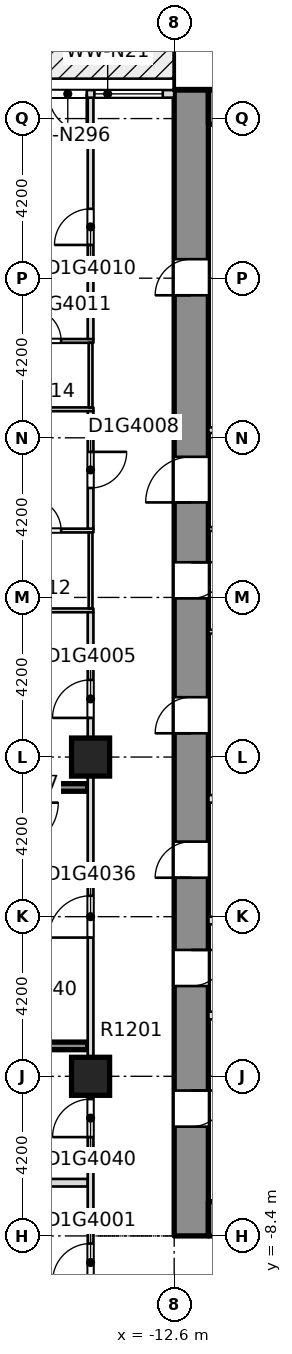
"""IFC4 building model, lengths in metres.
Left out: names, types, materials, properties, quantities, classifications, styles, units other than length and angle.
Written with IfcOpenShell. Run it as: python <this file> out.ifc"""

import sys

from ifc_helpers import new_model, si_unit, direction, frame, frame_2d, origin, origin_2d, place, context, subcontext, project, spatial, rectangle, extrude, element, fill, save


model = new_model("IFC4")
c1 = context("Model", 3, precision=1e-05, world=origin(), true_north=direction((0.0, 1.0)))
c2 = subcontext(c1, "Body", "Model", "MODEL_VIEW")
j1 = project(units=[si_unit("LENGTHUNIT", "METRE"), si_unit("PLANEANGLEUNIT", "RADIAN")], contexts=[c1])
p1 = place(None, origin())
s1 = spatial("IfcSite", under=j1, at=p1, CompositionType="ELEMENT")
p2 = place(p1, origin())
s2 = spatial("IfcBuilding", under=s1, at=p2, CompositionType="ELEMENT")
p3 = place(p2, frame((0.0, 0.0, 55.2)))
s3 = spatial("IfcBuildingStorey", under=s2, at=p3, CompositionType="ELEMENT", Elevation=55.2)
p4 = place(p3, frame((-12.15, -8.4, -0.32), z_axis=(0.0, 0.0, 1.0), x_axis=(0.0, 1.0, 0.0)))
e1 = element("IfcWall", 1, at=p4, inside=s3, PredefinedType="SHEAR", context=c2, shape_type="SweptSolid", body=[
    extrude(rectangle(XDim=30.15, YDim=0.9, at=frame_2d((15.075, 0.0))), origin(), (0.0, 0.0, 1.0), 3.45),
])
p5 = place(p4, frame((2.875, 0.0, 0.32)))
e2 = element("IfcOpeningElement", 2, at=p5, cuts=e1, PredefinedType="OPENING", context=c2, shape_type="SweptSolid", body=[
    extrude(rectangle(XDim=0.95, YDim=2.1, at=frame_2d((0.475, 1.05))), frame((0.0, 0.46, 0.0), z_axis=(0.0, -1.0, 0.0), x_axis=(1.0, 0.0, 0.0)), (0.0, 0.0, 1.0), 0.92),
])
p6 = place(p4, frame((6.575, 0.0, 0.32)))
e3 = element("IfcOpeningElement", 3, at=p6, cuts=e1, PredefinedType="OPENING", context=c2, shape_type="SweptSolid", body=[
    extrude(rectangle(XDim=0.95, YDim=2.1, at=frame_2d((0.475, 1.05))), frame((0.0, 0.46, 0.0), z_axis=(0.0, -1.0, 0.0), x_axis=(1.0, 0.0, 0.0)), (0.0, 0.0, 1.0), 0.92),
])
p7 = place(p4, frame((9.425, 0.0, 0.32)))
e4 = element("IfcOpeningElement", 4, at=p7, cuts=e1, PredefinedType="OPENING", context=c2, shape_type="SweptSolid", body=[
    extrude(rectangle(XDim=0.95, YDim=2.1, at=frame_2d((0.475, 1.05))), frame((0.0, 0.46, 0.0), z_axis=(0.0, -1.0, 0.0), x_axis=(1.0, 0.0, 0.0)), (0.0, 0.0, 1.0), 0.92),
])
p8 = place(p4, frame((13.225, 0.0, 0.32)))
e5 = element("IfcOpeningElement", 5, at=p8, cuts=e1, PredefinedType="OPENING", context=c2, shape_type="SweptSolid", body=[
    extrude(rectangle(XDim=0.95, YDim=2.1, at=frame_2d((0.475, 1.05))), frame((0.0, 0.46, 0.0), z_axis=(0.0, -1.0, 0.0), x_axis=(1.0, 0.0, 0.0)), (0.0, 0.0, 1.0), 0.92),
])
p9 = place(p4, frame((16.775, 0.0, 0.32)))
e6 = element("IfcOpeningElement", 6, at=p9, cuts=e1, PredefinedType="OPENING", context=c2, shape_type="SweptSolid", body=[
    extrude(rectangle(XDim=0.95, YDim=2.1, at=frame_2d((0.475, 1.05))), frame((0.0, 0.46, 0.0), z_axis=(0.0, -1.0, 0.0), x_axis=(1.0, 0.0, 0.0)), (0.0, 0.0, 1.0), 0.92),
])
p10 = place(p4, frame((24.75, 0.0, 0.32)))
e7 = element("IfcOpeningElement", 7, at=p10, cuts=e1, PredefinedType="OPENING", context=c2, shape_type="SweptSolid", body=[
    extrude(rectangle(XDim=0.95, YDim=2.1, at=frame_2d((0.475, 1.05))), frame((0.0, 0.46, 0.0), z_axis=(0.0, -1.0, 0.0), x_axis=(1.0, 0.0, 0.0)), (0.0, 0.0, 1.0), 0.92),
])
p11 = place(p4, frame((19.3, 0.0, 0.32)))
e8 = element("IfcOpeningElement", 8, at=p11, cuts=e1, PredefinedType="OPENING", context=c2, shape_type="SweptSolid", body=[
    extrude(rectangle(XDim=1.2, YDim=2.1, at=frame_2d((0.6, 1.05))), frame((0.0, 0.46, 0.0), z_axis=(0.0, -1.0, 0.0), x_axis=(1.0, 0.0, 0.0)), (0.0, 0.0, 1.0), 0.92),
])
p12 = place(p3, frame((-11.7, -7.95, -0.32), z_axis=(0.0, 0.0, 1.0), x_axis=(1.0, 0.0, 0.0)))
e9 = element("IfcWall", 9, at=p12, inside=s3, PredefinedType="SHEAR", context=c2, shape_type="SweptSolid", body=[
    extrude(rectangle(XDim=23.4, YDim=0.9, at=frame_2d((11.7, 0.0))), origin(), (0.0, 0.0, 1.0), 3.45),
])
p13 = place(p12, frame((6.95, 0.0, 0.32)))
e10 = element("IfcOpeningElement", 10, at=p13, cuts=e9, PredefinedType="OPENING", context=c2, shape_type="SweptSolid", body=[
    extrude(rectangle(XDim=1.8, YDim=2.1, at=frame_2d((0.9, 1.05))), frame((0.0, 0.46, 0.0), z_axis=(0.0, -1.0, 0.0), x_axis=(1.0, 0.0, 0.0)), (0.0, 0.0, 1.0), 0.92),
])
p14 = place(p12, frame((14.65, 0.0, 0.32)))
e11 = element("IfcOpeningElement", 11, at=p14, cuts=e9, PredefinedType="OPENING", context=c2, shape_type="SweptSolid", body=[
    extrude(rectangle(XDim=1.8, YDim=2.1, at=frame_2d((0.9, 1.05))), frame((0.0, 0.46, 0.0), z_axis=(0.0, -1.0, 0.0), x_axis=(1.0, 0.0, 0.0)), (0.0, 0.0, 1.0), 0.92),
])
p15 = place(p3, frame((-11.7, 21.3, -0.32), z_axis=(0.0, 0.0, 1.0), x_axis=(1.0, 0.0, 0.0)))
e12 = element("IfcWall", 12, at=p15, inside=s3, PredefinedType="SOLIDWALL", context=c2, shape_type="SweptSolid", body=[
    extrude(rectangle(XDim=23.4, YDim=0.9, at=frame_2d((11.7, 0.0))), origin(), (0.0, 0.0, 1.0), 3.45),
])
for number, where, z_axis, x_axis in (
    (13, (-14.8, -4.2, -0.32), (0.0, 0.0, 1.0), (1.0, 0.0, 0.0)),
    (14, (-14.8, 4.2, -0.32), (0.0, 0.0, 1.0), (1.0, 0.0, 0.0)),
):
    element("IfcColumn", number, at=place(p3, frame(where, z_axis=z_axis, x_axis=x_axis)), inside=s3, PredefinedType="COLUMN", context=c2, shape_type="SweptSolid", body=[
        extrude(rectangle(XDim=1.0, YDim=1.0, at=origin_2d()), origin(), (0.0, 0.0, 1.0), 3.45),
    ])
p16 = place(p3, frame((-25.75, -7.0, 0.0), z_axis=(0.0, 0.0, 1.0), x_axis=(1.0, 0.0, 0.0)))
e15 = element("IfcWall", 15, at=p16, inside=s3, PredefinedType="PARTITIONING", context=c2, shape_type="SweptSolid", body=[
    extrude(rectangle(XDim=10.875, YDim=0.2, at=frame_2d((5.438, 0.0))), origin(), (0.0, 0.0, 1.0), 3.13),
])
p17 = place(p3, frame((-20.45, 3.4, 0.0), z_axis=(0.0, 0.0, 1.0), x_axis=(1.0, 0.0, 0.0)))
e16 = element("IfcWall", 16, at=p17, inside=s3, PredefinedType="SOLIDWALL", context=c2, shape_type="SweptSolid", body=[
    extrude(rectangle(XDim=5.575, YDim=0.2, at=frame_2d((2.788, 0.0))), origin(), (0.0, 0.0, 1.0), 3.13),
])
p18 = place(p3, frame((-17.25, 8.06, 0.0), z_axis=(0.0, 0.0, 1.0), x_axis=(1.0, 0.0, 0.0)))
e17 = element("IfcWall", 17, at=p18, inside=s3, PredefinedType="PARTITIONING", context=c2, shape_type="SweptSolid", body=[
    extrude(rectangle(XDim=2.525, YDim=0.1, at=frame_2d((1.262, 0.0))), origin(), (0.0, 0.0, 1.0), 3.13),
])
p19 = place(p3, frame((-17.25, 10.16, 0.0), z_axis=(0.0, 0.0, 1.0), x_axis=(1.0, 0.0, 0.0)))
e18 = element("IfcWall", 18, at=p19, inside=s3, PredefinedType="PARTITIONING", context=c2, shape_type="SweptSolid", body=[
    extrude(rectangle(XDim=2.525, YDim=0.1, at=frame_2d((1.262, 0.0))), origin(), (0.0, 0.0, 1.0), 3.13),
])
p20 = place(p19, frame((0.825, 0.0, 0.0)))
e19 = element("IfcOpeningElement", 19, at=p20, cuts=e18, PredefinedType="OPENING", context=c2, shape_type="SweptSolid", body=[
    extrude(rectangle(XDim=0.85, YDim=2.1, at=frame_2d((0.425, 1.05))), frame((0.0, 0.06, 0.0), z_axis=(0.0, -1.0, 0.0), x_axis=(1.0, 0.0, 0.0)), (0.0, 0.0, 1.0), 0.12),
])
p21 = place(p3, frame((-17.25, 13.35, 0.0), z_axis=(0.0, 0.0, 1.0), x_axis=(1.0, 0.0, 0.0)))
e20 = element("IfcWall", 20, at=p21, inside=s3, PredefinedType="PARTITIONING", context=c2, shape_type="SweptSolid", body=[
    extrude(rectangle(XDim=2.525, YDim=0.1, at=frame_2d((1.262, 0.0))), origin(), (0.0, 0.0, 1.0), 3.13),
])
p22 = place(p3, frame((-17.25, 15.15, 0.0), z_axis=(0.0, 0.0, 1.0), x_axis=(1.0, 0.0, 0.0)))
e21 = element("IfcWall", 21, at=p22, inside=s3, PredefinedType="PARTITIONING", context=c2, shape_type="SweptSolid", body=[
    extrude(rectangle(XDim=2.525, YDim=0.1, at=frame_2d((1.262, 0.0))), origin(), (0.0, 0.0, 1.0), 3.13),
])
p23 = place(p22, frame((0.825, 0.0, 0.0)))
e22 = element("IfcOpeningElement", 22, at=p23, cuts=e21, PredefinedType="OPENING", context=c2, shape_type="SweptSolid", body=[
    extrude(rectangle(XDim=0.85, YDim=2.1, at=frame_2d((0.425, 1.05))), frame((0.0, 0.06, 0.0), z_axis=(0.0, -1.0, 0.0), x_axis=(1.0, 0.0, 0.0)), (0.0, 0.0, 1.0), 0.12),
])
p24 = place(p3, frame((-14.8, -10.525, 0.0), z_axis=(0.0, 0.0, 1.0), x_axis=(0.0, 1.0, 0.0)))
e23 = element("IfcWall", 23, at=p24, inside=s3, PredefinedType="PARTITIONING", context=c2, shape_type="SweptSolid", body=[
    extrude(rectangle(XDim=18.535, YDim=0.15, at=frame_2d((9.268, 0.0))), origin(), (0.0, 0.0, 1.0), 3.13),
])
p25 = place(p24, frame((0.925, 0.0, 0.0)))
e24 = element("IfcOpeningElement", 24, at=p25, cuts=e23, PredefinedType="OPENING", context=c2, shape_type="SweptSolid", body=[
    extrude(rectangle(XDim=1.0, YDim=2.1, at=frame_2d((0.5, 1.05))), frame((0.0, 0.085, 0.0), z_axis=(0.0, -1.0, 0.0), x_axis=(1.0, 0.0, 0.0)), (0.0, 0.0, 1.0), 0.17),
])
p26 = place(p24, frame((15.755, 0.0, 0.0)))
e25 = element("IfcOpeningElement", 25, at=p26, cuts=e23, PredefinedType="OPENING", context=c2, shape_type="SweptSolid", body=[
    extrude(rectangle(XDim=1.0, YDim=2.1, at=frame_2d((0.5, 1.05))), frame((0.0, 0.085, 0.0), z_axis=(0.0, -1.0, 0.0), x_axis=(1.0, 0.0, 0.0)), (0.0, 0.0, 1.0), 0.17),
])
p27 = place(p24, frame((9.975, 0.0, 0.0)))
e26 = element("IfcOpeningElement", 26, at=p27, cuts=e23, PredefinedType="OPENING", context=c2, shape_type="SweptSolid", body=[
    extrude(rectangle(XDim=1.1, YDim=2.1, at=frame_2d((0.55, 1.05))), frame((0.0, 0.085, 0.0), z_axis=(0.0, -1.0, 0.0), x_axis=(1.0, 0.0, 0.0)), (0.0, 0.0, 1.0), 0.17),
])
p28 = place(p24, frame((4.725, 0.0, 0.0)))
e27 = element("IfcOpeningElement", 27, at=p28, cuts=e23, PredefinedType="OPENING", context=c2, shape_type="SweptSolid", body=[
    extrude(rectangle(XDim=1.0, YDim=2.1, at=frame_2d((0.5, 1.05))), frame((0.0, 0.085, 0.0), z_axis=(0.0, -1.0, 0.0), x_axis=(1.0, 0.0, 0.0)), (0.0, 0.0, 1.0), 0.17),
])
p29 = place(p3, frame((-14.8, 8.11, 0.0), z_axis=(0.0, 0.0, 1.0), x_axis=(0.0, 1.0, 0.0)))
e28 = element("IfcWall", 28, at=p29, inside=s3, PredefinedType="PARTITIONING", context=c2, shape_type="SweptSolid", body=[
    extrude(rectangle(XDim=2.0, YDim=0.1, at=frame_2d((1.0, 0.0))), origin(), (0.0, 0.0, 1.0), 3.13),
])
p30 = place(p3, frame((-14.8, 10.21, 0.0), z_axis=(0.0, 0.0, 1.0), x_axis=(0.0, 1.0, 0.0)))
e29 = element("IfcWall", 29, at=p30, inside=s3, PredefinedType="PARTITIONING", context=c2, shape_type="SweptSolid", body=[
    extrude(rectangle(XDim=3.09, YDim=0.15, at=frame_2d((1.545, 0.0))), origin(), (0.0, 0.0, 1.0), 3.13),
])
p31 = place(p30, frame((1.07, 0.0, 0.0)))
e30 = element("IfcOpeningElement", 30, at=p31, cuts=e29, PredefinedType="OPENING", context=c2, shape_type="SweptSolid", body=[
    extrude(rectangle(XDim=0.95, YDim=2.1, at=frame_2d((0.475, 1.05))), frame((0.0, 0.085, 0.0), z_axis=(0.0, -1.0, 0.0), x_axis=(1.0, 0.0, 0.0)), (0.0, 0.0, 1.0), 0.17),
])
p32 = place(p3, frame((-14.8, 13.4, 0.0), z_axis=(0.0, 0.0, 1.0), x_axis=(0.0, 1.0, 0.0)))
e31 = element("IfcWall", 31, at=p32, inside=s3, PredefinedType="PARTITIONING", context=c2, shape_type="SweptSolid", body=[
    extrude(rectangle(XDim=1.7, YDim=0.1, at=frame_2d((0.85, 0.0))), origin(), (0.0, 0.0, 1.0), 3.13),
])
p33 = place(p3, frame((-14.8, 15.2, 0.0), z_axis=(0.0, 0.0, 1.0), x_axis=(0.0, 1.0, 0.0)))
e32 = element("IfcWall", 32, at=p33, inside=s3, PredefinedType="PARTITIONING", context=c2, shape_type="SweptSolid", body=[
    extrude(rectangle(XDim=6.35, YDim=0.15, at=frame_2d((3.175, 0.0))), origin(), (0.0, 0.0, 1.0), 3.13),
])
p34 = place(p33, frame((2.475, 0.0, 0.0)))
e33 = element("IfcOpeningElement", 33, at=p34, cuts=e32, PredefinedType="OPENING", context=c2, shape_type="SweptSolid", body=[
    extrude(rectangle(XDim=0.95, YDim=2.1, at=frame_2d((0.475, 1.05))), frame((0.0, 0.085, 0.0), z_axis=(0.0, -1.0, 0.0), x_axis=(1.0, 0.0, 0.0)), (0.0, 0.0, 1.0), 0.17),
])
p35 = place(p3, frame((-12.6, 21.65, 0.0), z_axis=(0.0, 0.0, 1.0), x_axis=(-1.0, 0.0, 0.0)))
e34 = element("IfcWall", 34, at=p35, inside=s3, PredefinedType="STANDARD", context=c2, shape_type="SweptSolid", body=[
    extrude(rectangle(XDim=3.5, YDim=0.2, at=frame_2d((1.75, 0.0))), origin(), (0.0, 0.0, 1.0), 3.13),
])
p36 = place(p35, frame((0.3, 0.0, 0.2)))
e35 = element("IfcOpeningElement", 35, at=p36, cuts=e34, PredefinedType="OPENING", context=c2, shape_type="SweptSolid", body=[
    extrude(rectangle(XDim=1.8, YDim=2.65, at=frame_2d((0.9, 1.325))), frame((0.0, 0.11, 0.0), z_axis=(0.0, -1.0, 0.0), x_axis=(1.0, 0.0, 0.0)), (0.0, 0.0, 1.0), 0.22),
])
p37 = place(p35, frame((2.3, 0.0, 0.0)))
e36 = element("IfcOpeningElement", 36, at=p37, cuts=e34, PredefinedType="OPENING", context=c2, shape_type="SweptSolid", body=[
    extrude(rectangle(XDim=1.0, YDim=2.4, at=frame_2d((0.5, 1.2))), frame((0.0, 0.11, 0.0), z_axis=(0.0, -1.0, 0.0), x_axis=(1.0, 0.0, 0.0)), (0.0, 0.0, 1.0), 0.22),
])
for number, where, z_axis, x_axis in (
    (37, (-11.699, -2.6, 0.0), (0.0, 0.0, 1.0), (1.0, 0.0, 0.0)),
    (38, (-11.699, -0.1, 0.0), (0.0, 0.0, 1.0), (1.0, 0.0, 0.0)),
    (39, (-11.699, 3.1, 0.0), (0.0, 0.0, 1.0), (1.0, 0.0, 0.0)),
):
    element("IfcWall", number, at=place(p3, frame(where, z_axis=z_axis, x_axis=x_axis)), inside=s3, PredefinedType="PARTITIONING", context=c2, shape_type="SweptSolid", body=[
        extrude(rectangle(XDim=2.848, YDim=0.2, at=frame_2d((1.424, 0.0))), origin(), (0.0, 0.0, 1.0), 3.13),
    ])
for number, where, z_axis, x_axis in (
    (40, (-11.699, 7.5, 0.0), (0.0, 0.0, 1.0), (1.0, 0.0, 0.0)),
    (41, (-11.699, 10.2, 0.0), (0.0, 0.0, 1.0), (1.0, 0.0, 0.0)),
):
    element("IfcWall", number, at=place(p3, frame(where, z_axis=z_axis, x_axis=x_axis)), inside=s3, PredefinedType="PARTITIONING", context=c2, shape_type="SweptSolid", body=[
        extrude(rectangle(XDim=2.848, YDim=0.1, at=frame_2d((1.424, 0.0))), origin(), (0.0, 0.0, 1.0), 3.13),
    ])
p38 = place(p3, frame((-11.699, 12.8, 0.0), z_axis=(0.0, 0.0, 1.0), x_axis=(1.0, 0.0, 0.0)))
e42 = element("IfcWall", 42, at=p38, inside=s3, PredefinedType="PARTITIONING", context=c2, shape_type="SweptSolid", body=[
    extrude(rectangle(XDim=2.848, YDim=0.15, at=frame_2d((1.424, 0.0))), origin(), (0.0, 0.0, 1.0), 3.13),
])
p39 = place(p3, frame((-23.6, -3.4, 0.0), z_axis=(0.0, 0.0, 1.0), x_axis=(1.0, 0.0, 0.0)))
e43 = element("IfcWall", 43, at=p39, inside=s3, PredefinedType="SOLIDWALL", context=c2, shape_type="SweptSolid", body=[
    extrude(rectangle(XDim=8.725, YDim=0.2, at=frame_2d((4.363, 0.0))), origin(), (0.0, 0.0, 1.0), 3.13),
])
p40 = place(p25, origin())
e44 = element("IfcDoor", 44, at=p40, inside=s3, OperationType="SINGLE_SWING_LEFT", PredefinedType="DOOR", context=c2, shape_type="SweptSolid", body=[
    extrude(rectangle(XDim=1.0, YDim=2.1, at=frame_2d((0.5, 1.05))), frame((0.0, 0.025, 0.0), z_axis=(0.0, -1.0, 0.0), x_axis=(1.0, 0.0, 0.0)), (0.0, 0.0, 1.0), 0.05),
])
fill(e24, e44)
p41 = place(p26, origin())
e45 = element("IfcDoor", 45, at=p41, inside=s3, OperationType="SINGLE_SWING_RIGHT", PredefinedType="DOOR", context=c2, shape_type="SweptSolid", body=[
    extrude(rectangle(XDim=1.0, YDim=2.1, at=frame_2d((0.5, 1.05))), frame((0.0, 0.025, 0.0), z_axis=(0.0, -1.0, 0.0), x_axis=(1.0, 0.0, 0.0)), (0.0, 0.0, 1.0), 0.05),
])
fill(e25, e45)
p42 = place(p31, origin())
e46 = element("IfcDoor", 46, at=p42, inside=s3, OperationType="SINGLE_SWING_LEFT", PredefinedType="DOOR", context=c2, shape_type="SweptSolid", body=[
    extrude(rectangle(XDim=0.95, YDim=2.1, at=frame_2d((0.475, 1.05))), frame((0.0, 0.025, 0.0), z_axis=(0.0, -1.0, 0.0), x_axis=(1.0, 0.0, 0.0)), (0.0, 0.0, 1.0), 0.05),
])
fill(e30, e46)
p43 = place(p20, origin())
e47 = element("IfcDoor", 47, at=p43, inside=s3, OperationType="SINGLE_SWING_RIGHT", PredefinedType="DOOR", context=c2, shape_type="SweptSolid", body=[
    extrude(rectangle(XDim=0.85, YDim=2.1, at=frame_2d((0.425, 1.05))), frame((0.0, 0.025, 0.0), z_axis=(0.0, -1.0, 0.0), x_axis=(1.0, 0.0, 0.0)), (0.0, 0.0, 1.0), 0.05),
])
fill(e19, e47)
p44 = place(p34, origin())
e48 = element("IfcDoor", 48, at=p44, inside=s3, OperationType="SINGLE_SWING_RIGHT", PredefinedType="DOOR", context=c2, shape_type="SweptSolid", body=[
    extrude(rectangle(XDim=0.95, YDim=2.1, at=frame_2d((0.475, 1.05))), frame((0.0, 0.025, 0.0), z_axis=(0.0, -1.0, 0.0), x_axis=(1.0, 0.0, 0.0)), (0.0, 0.0, 1.0), 0.05),
])
fill(e33, e48)
p45 = place(p23, origin())
e49 = element("IfcDoor", 49, at=p45, inside=s3, OperationType="SINGLE_SWING_RIGHT", PredefinedType="DOOR", context=c2, shape_type="SweptSolid", body=[
    extrude(rectangle(XDim=0.85, YDim=2.1, at=frame_2d((0.425, 1.05))), frame((0.0, 0.025, 0.0), z_axis=(0.0, -1.0, 0.0), x_axis=(1.0, 0.0, 0.0)), (0.0, 0.0, 1.0), 0.05),
])
fill(e22, e49)
p46 = place(p27, origin())
e50 = element("IfcDoor", 50, at=p46, inside=s3, OperationType="SINGLE_SWING_RIGHT", PredefinedType="DOOR", context=c2, shape_type="SweptSolid", body=[
    extrude(rectangle(XDim=1.1, YDim=2.1, at=frame_2d((0.55, 1.05))), frame((0.0, 0.025, 0.0), z_axis=(0.0, -1.0, 0.0), x_axis=(1.0, 0.0, 0.0)), (0.0, 0.0, 1.0), 0.05),
])
fill(e26, e50)
p47 = place(p28, origin())
e51 = element("IfcDoor", 51, at=p47, inside=s3, OperationType="SINGLE_SWING_LEFT", PredefinedType="DOOR", context=c2, shape_type="SweptSolid", body=[
    extrude(rectangle(XDim=1.0, YDim=2.1, at=frame_2d((0.5, 1.05))), frame((0.0, 0.025, 0.0), z_axis=(0.0, -1.0, 0.0), x_axis=(1.0, 0.0, 0.0)), (0.0, 0.0, 1.0), 0.05),
])
fill(e27, e51)
p48 = place(p36, origin())
e52 = element("IfcWindow", 52, at=p48, inside=s3, PartitioningType="SINGLE_PANEL", PredefinedType="WINDOW", context=c2, shape_type="SweptSolid", body=[
    extrude(rectangle(XDim=1.8, YDim=2.65, at=frame_2d((0.9, 1.325))), frame((0.0, 0.03, 0.0), z_axis=(0.0, -1.0, 0.0), x_axis=(1.0, 0.0, 0.0)), (0.0, 0.0, 1.0), 0.06),
])
fill(e35, e52)
p49 = place(p37, origin())
e53 = element("IfcDoor", 53, at=p49, inside=s3, OperationType="SINGLE_SWING_LEFT", PredefinedType="DOOR", context=c2, shape_type="SweptSolid", body=[
    extrude(rectangle(XDim=1.0, YDim=2.4, at=frame_2d((0.5, 1.2))), frame((0.0, 0.025, 0.0), z_axis=(0.0, -1.0, 0.0), x_axis=(1.0, 0.0, 0.0)), (0.0, 0.0, 1.0), 0.05),
])
fill(e36, e53)
p50 = place(p5, origin())
e54 = element("IfcDoor", 54, at=p50, inside=s3, OperationType="SINGLE_SWING_LEFT", PredefinedType="DOOR", context=c2, shape_type="SweptSolid", body=[
    extrude(rectangle(XDim=0.95, YDim=2.1, at=frame_2d((0.475, 1.05))), frame((0.0, 0.025, 0.0), z_axis=(0.0, -1.0, 0.0), x_axis=(1.0, 0.0, 0.0)), (0.0, 0.0, 1.0), 0.05),
])
fill(e2, e54)
p51 = place(p6, origin())
e55 = element("IfcDoor", 55, at=p51, inside=s3, OperationType="SINGLE_SWING_LEFT", PredefinedType="DOOR", context=c2, shape_type="SweptSolid", body=[
    extrude(rectangle(XDim=0.95, YDim=2.1, at=frame_2d((0.475, 1.05))), frame((0.0, 0.025, 0.0), z_axis=(0.0, -1.0, 0.0), x_axis=(1.0, 0.0, 0.0)), (0.0, 0.0, 1.0), 0.05),
])
fill(e3, e55)
p52 = place(p7, origin())
e56 = element("IfcDoor", 56, at=p52, inside=s3, OperationType="SINGLE_SWING_LEFT", PredefinedType="DOOR", context=c2, shape_type="SweptSolid", body=[
    extrude(rectangle(XDim=0.95, YDim=2.1, at=frame_2d((0.475, 1.05))), frame((0.0, 0.025, 0.0), z_axis=(0.0, -1.0, 0.0), x_axis=(1.0, 0.0, 0.0)), (0.0, 0.0, 1.0), 0.05),
])
fill(e4, e56)
p53 = place(p8, origin())
e57 = element("IfcDoor", 57, at=p53, inside=s3, OperationType="SINGLE_SWING_LEFT", PredefinedType="DOOR", context=c2, shape_type="SweptSolid", body=[
    extrude(rectangle(XDim=0.95, YDim=2.1, at=frame_2d((0.475, 1.05))), frame((0.0, 0.025, 0.0), z_axis=(0.0, -1.0, 0.0), x_axis=(1.0, 0.0, 0.0)), (0.0, 0.0, 1.0), 0.05),
])
fill(e5, e57)
p54 = place(p9, origin())
e58 = element("IfcDoor", 58, at=p54, inside=s3, OperationType="SINGLE_SWING_LEFT", PredefinedType="DOOR", context=c2, shape_type="SweptSolid", body=[
    extrude(rectangle(XDim=0.95, YDim=2.1, at=frame_2d((0.475, 1.05))), frame((0.0, 0.025, 0.0), z_axis=(0.0, -1.0, 0.0), x_axis=(1.0, 0.0, 0.0)), (0.0, 0.0, 1.0), 0.05),
])
fill(e6, e58)
p55 = place(p10, origin())
e59 = element("IfcDoor", 59, at=p55, inside=s3, OperationType="SINGLE_SWING_LEFT", PredefinedType="DOOR", context=c2, shape_type="SweptSolid", body=[
    extrude(rectangle(XDim=0.95, YDim=2.1, at=frame_2d((0.475, 1.05))), frame((0.0, 0.025, 0.0), z_axis=(0.0, -1.0, 0.0), x_axis=(1.0, 0.0, 0.0)), (0.0, 0.0, 1.0), 0.05),
])
fill(e7, e59)
p56 = place(p11, origin())
e60 = element("IfcDoor", 60, at=p56, inside=s3, OperationType="SINGLE_SWING_LEFT", PredefinedType="DOOR", context=c2, shape_type="SweptSolid", body=[
    extrude(rectangle(XDim=1.2, YDim=2.1, at=frame_2d((0.6, 1.05))), frame((0.0, 0.025, 0.0), z_axis=(0.0, -1.0, 0.0), x_axis=(1.0, 0.0, 0.0)), (0.0, 0.0, 1.0), 0.05),
])
fill(e8, e60)
save(model, sys.argv[1])
